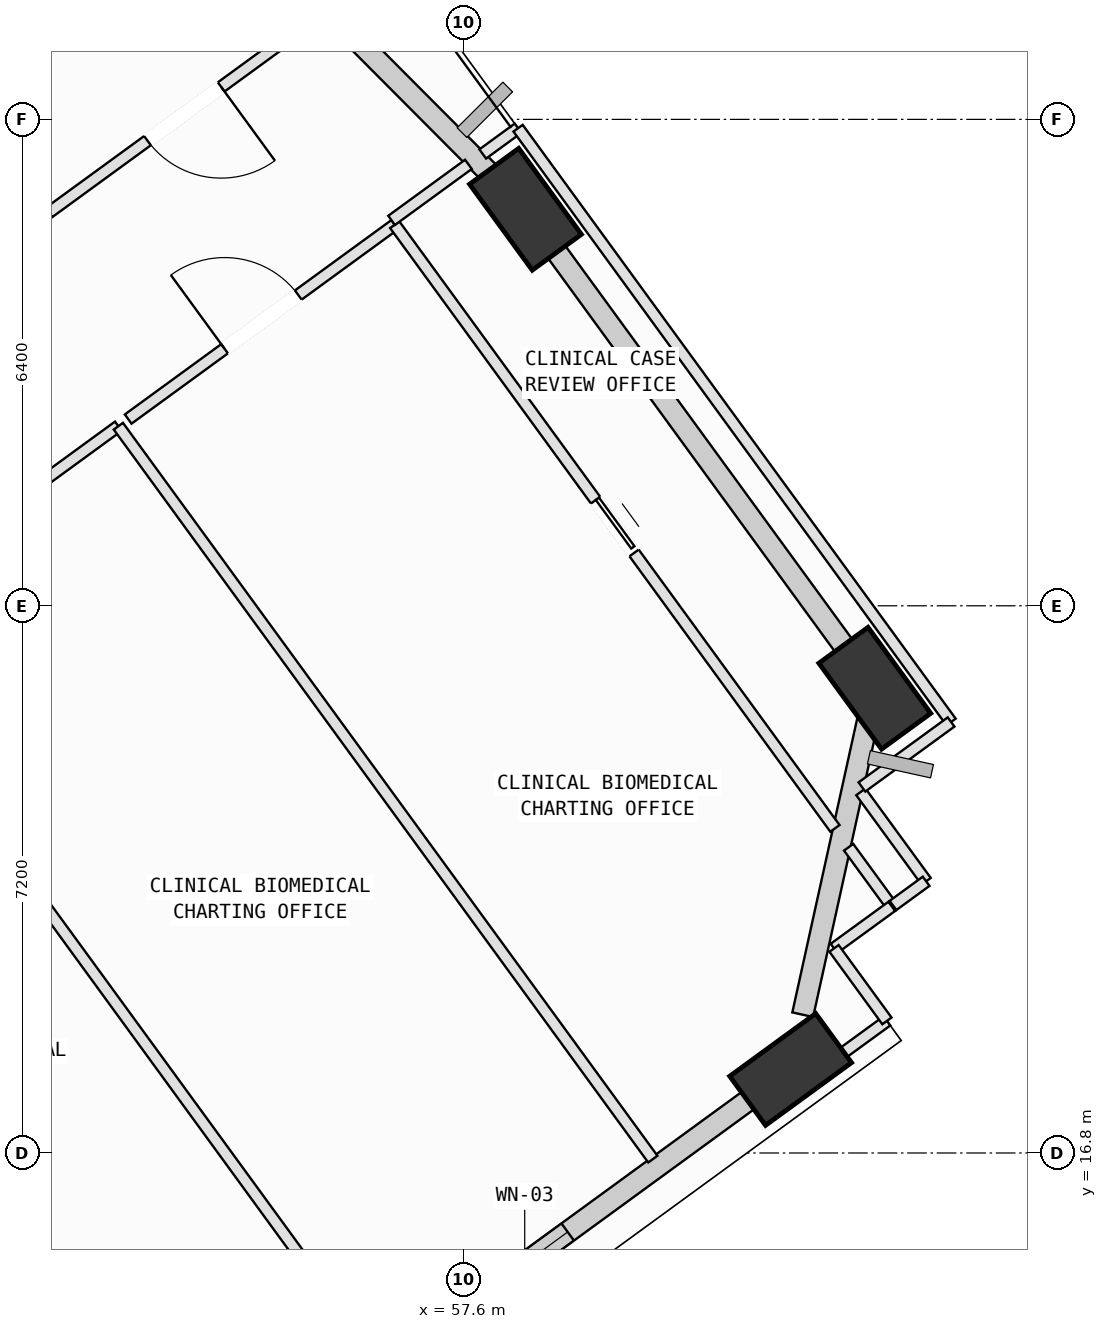
"""IFC4 building model, lengths in metres.
Left out: names, types, materials, properties, quantities, classifications, styles, units other than length and angle.
Written with IfcOpenShell. Run it as: python <this file> out.ifc"""

import sys

from ifc_helpers import new_model, si_unit, direction, frame, frame_2d, origin, origin_2d, place, context, subcontext, project, spatial, rectangle, extrude, element, fill, save


model = new_model("IFC4")
c1 = context("Model", 3, precision=1e-05, world=origin(), true_north=direction((0.0, 1.0)))
c2 = subcontext(c1, "Body", "Model", "MODEL_VIEW")
j1 = project(units=[si_unit("LENGTHUNIT", "METRE"), si_unit("PLANEANGLEUNIT", "RADIAN")], contexts=[c1])
p1 = place(None, origin())
s1 = spatial("IfcSite", under=j1, at=p1, CompositionType="ELEMENT")
p2 = place(p1, origin())
s2 = spatial("IfcBuilding", under=s1, at=p2, CompositionType="ELEMENT")
p3 = place(p2, frame((0.0, 0.0, 177.8)))
s3 = spatial("IfcBuildingStorey", under=s2, at=p3, CompositionType="ELEMENT", Elevation=177.8)
p4 = place(p3, frame((61.9, 17.899, 0.002), z_axis=(0.027414073551, 0.116691764407, 0.99278975654), x_axis=(-0.920353673675, -0.384657064263, 0.070626186825)))
e1 = element("IfcColumn", 1, at=p4, inside=s3, PredefinedType="COLUMN", context=c2, shape_type="SweptSolid", body=[
    extrude(rectangle(XDim=1.4, YDim=0.8, at=origin_2d()), origin(), (0.0, 0.0, 1.0), 4.025),
])
p5 = place(p3, frame((63.007, 22.915, 0.002), z_axis=(0.006731050457, 0.121098268128, 0.992617702047), x_axis=(0.543777741516, -0.833488041399, 0.097997207488)))
e2 = element("IfcColumn", 2, at=p5, inside=s3, PredefinedType="COLUMN", context=c2, shape_type="SweptSolid", body=[
    extrude(rectangle(XDim=1.4, YDim=0.8, at=origin_2d()), origin(), (0.0, 0.0, 1.0), 4.026),
])
p6 = place(p3, frame((58.412, 29.217, 0.002), z_axis=(-0.01907877043, 0.102138258255, 0.994587239371), x_axis=(0.726736856615, -0.68176627389, 0.083954088789)))
e3 = element("IfcColumn", 3, at=p6, inside=s3, PredefinedType="COLUMN", context=c2, shape_type="SweptSolid", body=[
    extrude(rectangle(XDim=1.4, YDim=0.8, at=origin_2d()), origin(), (0.0, 0.0, 1.0), 4.018),
])
p7 = place(p3, frame((61.667, 17.73, 0.0), z_axis=(0.0, 0.0, 1.0), x_axis=(-0.807986195616, -0.589201415217, 0.0)))
e4 = element("IfcWall", 4, at=p7, inside=s3, PredefinedType="SOLIDWALL", context=c2, shape_type="SweptSolid", body=[
    extrude(rectangle(XDim=6.242, YDim=0.28, at=frame_2d((3.121, 0.0))), origin(), (0.0, 0.0, 1.0), 3.265),
])
p8 = place(p7, frame((3.343, 0.0, 0.75)))
e5 = element("IfcOpeningElement", 5, at=p8, cuts=e4, PredefinedType="OPENING", context=c2, shape_type="SweptSolid", body=[
    extrude(rectangle(XDim=1.4, YDim=1.85, at=frame_2d((0.7, 0.925))), frame((0.0, 0.15, 0.0), z_axis=(0.0, -1.0, 0.0), x_axis=(1.0, 0.0, 0.0)), (0.0, 0.0, 1.0), 0.3),
])
p9 = place(p3, frame((62.953, 22.667, 0.0), z_axis=(0.0, 0.0, 1.0), x_axis=(-0.215626878502, -0.976475831379, 0.0)))
e6 = element("IfcWall", 6, at=p9, inside=s3, PredefinedType="SOLIDWALL", context=c2, shape_type="SweptSolid", body=[
    extrude(rectangle(XDim=4.145, YDim=0.28, at=frame_2d((2.073, 0.0))), origin(), (0.0, 0.0, 1.0), 3.265),
])
p10 = place(p3, frame((58.588, 28.975, 0.0), z_axis=(0.0, 0.0, 1.0), x_axis=(0.589215364112, -0.807976023589, 0.0)))
e7 = element("IfcWall", 7, at=p10, inside=s3, PredefinedType="SOLIDWALL", context=c2, shape_type="SweptSolid", body=[
    extrude(rectangle(XDim=6.84, YDim=0.28, at=frame_2d((3.42, 0.0))), origin(), (0.0, 0.0, 1.0), 3.265),
])
p11 = place(p3, frame((51.712, 35.942, 0.0), z_axis=(0.0, 0.0, 1.0), x_axis=(0.705765695185, -0.708445328519, 0.0)))
e8 = element("IfcWall", 8, at=p11, inside=s3, PredefinedType="SOLIDWALL", context=c2, shape_type="SweptSolid", body=[
    extrude(rectangle(XDim=8.838, YDim=0.28, at=frame_2d((4.419, 0.0))), origin(), (0.0, 0.0, 1.0), 3.265),
])
p12 = place(p3, frame((45.783, 21.06, 0.0), z_axis=(0.0, 0.0, 1.0), x_axis=(0.589203876201, -0.807984401006, 0.0)))
e9 = element("IfcWall", 9, at=p12, inside=s3, PredefinedType="PARTITIONING", context=c2, shape_type="SweptSolid", body=[
    extrude(rectangle(XDim=11.935, YDim=0.15, at=frame_2d((5.967, 0.0))), origin(), (0.0, 0.0, 1.0), 3.78),
])
p13 = place(p3, frame((49.419, 23.711, 0.0), z_axis=(0.0, 0.0, 1.0), x_axis=(0.589193791038, -0.807991755281, 0.0)))
e10 = element("IfcWall", 10, at=p13, inside=s3, PredefinedType="PARTITIONING", context=c2, shape_type="SweptSolid", body=[
    extrude(rectangle(XDim=12.28, YDim=0.15, at=frame_2d((6.14, 0.0))), origin(), (0.0, 0.0, 1.0), 3.78),
])
p14 = place(p3, frame((49.548, 23.806, 0.0), z_axis=(0.0, 0.0, 1.0), x_axis=(0.808000835419, 0.589181338776, 0.0)))
e11 = element("IfcWall", 11, at=p14, inside=s3, PredefinedType="PARTITIONING", context=c2, shape_type="SweptSolid", body=[
    extrude(rectangle(XDim=4.34, YDim=0.15, at=frame_2d((2.17, 0.0))), origin(), (0.0, 0.0, 1.0), 3.065),
])
p15 = place(p14, frame((1.57, 0.0, 0.0)))
e12 = element("IfcOpeningElement", 12, at=p15, cuts=e11, PredefinedType="OPENING", context=c2, shape_type="SweptSolid", body=[
    extrude(rectangle(XDim=1.2, YDim=2.15, at=frame_2d((0.6, 1.075))), frame((0.0, 0.085, 0.0), z_axis=(0.0, -1.0, 0.0), x_axis=(1.0, 0.0, 0.0)), (0.0, 0.0, 1.0), 0.17),
])
p16 = place(p3, frame((53.055, 26.363, 0.0), z_axis=(0.0, 0.0, 1.0), x_axis=(0.589164923699, -0.808012804776, 0.0)))
e13 = element("IfcWall", 13, at=p16, inside=s3, PredefinedType="PARTITIONING", context=c2, shape_type="SweptSolid", body=[
    extrude(rectangle(XDim=11.936, YDim=0.15, at=frame_2d((5.968, 0.0))), origin(), (0.0, 0.0, 1.0), 3.78),
])
p17 = place(p3, frame((63.167, 18.538, 0.0), z_axis=(0.0, 0.0, 1.0), x_axis=(-0.80813518797, -0.588997044105, 0.0)))
e14 = element("IfcWall", 14, at=p17, inside=s3, PredefinedType="PARTITIONING", context=c2, shape_type="SweptSolid", body=[
    extrude(rectangle(XDim=1.688, YDim=0.15, at=frame_2d((0.844, 0.0))), origin(), (0.0, 0.0, 1.0), 3.78),
])
p18 = place(p3, frame((53.184, 26.457, 0.0), z_axis=(0.0, 0.0, 1.0), x_axis=(0.808027614648, 0.5891446121, 0.0)))
e15 = element("IfcWall", 15, at=p18, inside=s3, PredefinedType="PARTITIONING", context=c2, shape_type="SweptSolid", body=[
    extrude(rectangle(XDim=4.34, YDim=0.15, at=frame_2d((2.17, 0.0))), origin(), (0.0, 0.0, 1.0), 3.065),
])
p19 = place(p18, frame((1.57, 0.0, 0.0)))
e16 = element("IfcOpeningElement", 16, at=p19, cuts=e15, PredefinedType="OPENING", context=c2, shape_type="SweptSolid", body=[
    extrude(rectangle(XDim=1.2, YDim=2.15, at=frame_2d((0.6, 1.075))), frame((0.0, 0.085, 0.0), z_axis=(0.0, -1.0, 0.0), x_axis=(1.0, 0.0, 0.0)), (0.0, 0.0, 1.0), 0.17),
])
p20 = place(p3, frame((56.691, 29.014, 0.0), z_axis=(0.0, 0.0, 1.0), x_axis=(0.589193100836, -0.807992258582, 0.0)))
e17 = element("IfcWall", 17, at=p20, inside=s3, PredefinedType="PARTITIONING", context=c2, shape_type="SweptSolid", body=[
    extrude(rectangle(XDim=9.83, YDim=0.15, at=frame_2d((4.915, 0.0))), origin(), (0.0, 0.0, 1.0), 3.78),
])
p21 = place(p20, frame((4.485, 0.0, 0.0)))
e18 = element("IfcOpeningElement", 18, at=p21, cuts=e17, PredefinedType="OPENING", context=c2, shape_type="SweptSolid", body=[
    extrude(rectangle(XDim=0.86, YDim=2.06, at=frame_2d((0.43, 1.03))), frame((0.0, 0.085, 0.0), z_axis=(0.0, -1.0, 0.0), x_axis=(1.0, 0.0, 0.0)), (0.0, 0.0, 1.0), 0.17),
])
p22 = place(p3, frame((62.663, 20.823, 0.0), z_axis=(0.0, 0.0, 1.0), x_axis=(0.589527176238, -0.80774854285, 0.0)))
e19 = element("IfcWall", 19, at=p22, inside=s3, PredefinedType="PARTITIONING", context=c2, shape_type="SweptSolid", body=[
    extrude(rectangle(XDim=0.963, YDim=0.15, at=frame_2d((0.482, 0.0))), origin(), (0.0, 0.0, 1.0), 3.78),
])
p23 = place(p3, frame((63.231, 20.045, 0.0), z_axis=(0.0, 0.0, 1.0), x_axis=(-0.808612508058, -0.588341577498, 0.0)))
e20 = element("IfcWall", 20, at=p23, inside=s3, PredefinedType="PARTITIONING", context=c2, shape_type="SweptSolid", body=[
    extrude(rectangle(XDim=0.94, YDim=0.15, at=frame_2d((0.47, 0.0))), origin(), (0.0, 0.0, 1.0), 3.78),
])
p24 = place(p3, frame((62.471, 19.492, 0.0), z_axis=(0.0, 0.0, 1.0), x_axis=(0.589461777397, -0.807796269481, 0.0)))
e21 = element("IfcWall", 21, at=p24, inside=s3, PredefinedType="PARTITIONING", context=c2, shape_type="SweptSolid", body=[
    extrude(rectangle(XDim=1.181, YDim=0.15, at=frame_2d((0.59, 0.0))), origin(), (0.0, 0.0, 1.0), 3.78),
])
p25 = place(p3, frame((55.704, 31.772, 0.0), z_axis=(0.0, 0.0, 1.0), x_axis=(-0.80804817544, -0.589116411389, 0.0)))
e22 = element("IfcWall", 22, at=p25, inside=s3, PredefinedType="PARTITIONING", context=c2, shape_type="SweptSolid", body=[
    extrude(rectangle(XDim=4.408, YDim=0.15, at=frame_2d((2.204, 0.0))), origin(), (0.0, 0.0, 1.0), 3.78),
])
p26 = place(p25, frame((1.604, 0.0, 0.0)))
e23 = element("IfcOpeningElement", 23, at=p26, cuts=e22, PredefinedType="OPENING", context=c2, shape_type="SweptSolid", body=[
    extrude(rectangle(XDim=1.2, YDim=2.15, at=frame_2d((0.6, 1.075))), frame((0.0, 0.085, 0.0), z_axis=(0.0, -1.0, 0.0), x_axis=(1.0, 0.0, 0.0)), (0.0, 0.0, 1.0), 0.17),
])
p27 = place(p3, frame((62.824, 21.552, 0.0), z_axis=(0.0, 0.0, 1.0), x_axis=(0.589575434874, -0.807713319559, 0.0)))
e24 = element("IfcWall", 24, at=p27, inside=s3, PredefinedType="PARTITIONING", context=c2, shape_type="SweptSolid", body=[
    extrude(rectangle(XDim=1.457, YDim=0.15, at=frame_2d((0.729, 0.0))), origin(), (0.0, 0.0, 1.0), 3.78),
])
p28 = place(p3, frame((63.683, 20.375, 0.0), z_axis=(0.0, 0.0, 1.0), x_axis=(-0.807854975955, -0.589381317844, 0.0)))
e25 = element("IfcWall", 25, at=p28, inside=s3, PredefinedType="PARTITIONING", context=c2, shape_type="SweptSolid", body=[
    extrude(rectangle(XDim=0.54, YDim=0.15, at=frame_2d((0.27, 0.0))), origin(), (0.0, 0.0, 1.0), 3.78),
])
p29 = place(p3, frame((56.65, 29.071, 0.0), z_axis=(0.0, 0.0, 1.0), x_axis=(0.808052040035, 0.589111110569, 0.0)))
e26 = element("IfcWall", 26, at=p29, inside=s3, PredefinedType="PARTITIONING", context=c2, shape_type="SweptSolid", body=[
    extrude(rectangle(XDim=1.251, YDim=0.15, at=frame_2d((0.625, 0.0))), origin(), (0.0, 0.0, 1.0), 3.065),
])
p30 = place(p3, frame((57.849, 29.945, 0.0), z_axis=(0.0, 0.0, 1.0), x_axis=(0.808074872367, 0.589079791411, 0.0)))
e27 = element("IfcWall", 27, at=p30, inside=s3, PredefinedType="PARTITIONING", context=c2, shape_type="SweptSolid", body=[
    extrude(rectangle(XDim=0.575, YDim=0.15, at=frame_2d((0.288, 0.0))), origin(), (0.0, 0.0, 1.0), 3.78),
])
p31 = place(p3, frame((58.314, 30.284, 0.0), z_axis=(0.0, 0.0, 1.0), x_axis=(0.589175591652, -0.8080050261, 0.0)))
e28 = element("IfcWall", 28, at=p31, inside=s3, PredefinedType="PARTITIONING", context=c2, shape_type="SweptSolid", body=[
    extrude(rectangle(XDim=9.669, YDim=0.15, at=frame_2d((4.835, 0.0))), origin(), (0.0, 0.0, 1.0), 3.265),
])
p32 = place(p3, frame((64.011, 22.471, 0.0), z_axis=(0.0, 0.0, 1.0), x_axis=(-0.808139286001, -0.588991421348, 0.0)))
e29 = element("IfcWall", 29, at=p32, inside=s3, PredefinedType="PARTITIONING", context=c2, shape_type="SweptSolid", body=[
    extrude(rectangle(XDim=1.452, YDim=0.15, at=frame_2d((0.726, 0.0))), origin(), (0.0, 0.0, 1.0), 3.78),
])
p33 = place(p8, origin())
e30 = element("IfcWindow", 30, at=p33, inside=s3, PartitioningType="SINGLE_PANEL", PredefinedType="WINDOW", context=c2, shape_type="SweptSolid", body=[
    extrude(rectangle(XDim=1.4, YDim=1.85, at=frame_2d((0.7, 0.925))), frame((0.0, 0.03, 0.0), z_axis=(0.0, -1.0, 0.0), x_axis=(1.0, 0.0, 0.0)), (0.0, 0.0, 1.0), 0.06),
])
fill(e5, e30)
p34 = place(p19, origin())
e31 = element("IfcDoor", 31, at=p34, inside=s3, OperationType="SINGLE_SWING_LEFT", PredefinedType="DOOR", context=c2, shape_type="SweptSolid", body=[
    extrude(rectangle(XDim=1.2, YDim=2.15, at=frame_2d((0.6, 1.075))), frame((0.0, 0.025, 0.0), z_axis=(0.0, -1.0, 0.0), x_axis=(1.0, 0.0, 0.0)), (0.0, 0.0, 1.0), 0.05),
])
fill(e16, e31)
p35 = place(p26, origin())
e32 = element("IfcDoor", 32, at=p35, inside=s3, OperationType="SINGLE_SWING_LEFT", PredefinedType="DOOR", context=c2, shape_type="SweptSolid", body=[
    extrude(rectangle(XDim=1.2, YDim=2.15, at=frame_2d((0.6, 1.075))), frame((0.0, 0.025, 0.0), z_axis=(0.0, -1.0, 0.0), x_axis=(1.0, 0.0, 0.0)), (0.0, 0.0, 1.0), 0.05),
])
fill(e23, e32)
p36 = place(p21, origin())
e33 = element("IfcDoor", 33, at=p36, inside=s3, OperationType="SLIDING_TO_LEFT", PredefinedType="DOOR", context=c2, shape_type="SweptSolid", body=[
    extrude(rectangle(XDim=0.86, YDim=2.06, at=frame_2d((0.43, 1.03))), frame((0.0, 0.025, 0.0), z_axis=(0.0, -1.0, 0.0), x_axis=(1.0, 0.0, 0.0)), (0.0, 0.0, 1.0), 0.05),
])
fill(e18, e33)
save(model, sys.argv[1])
